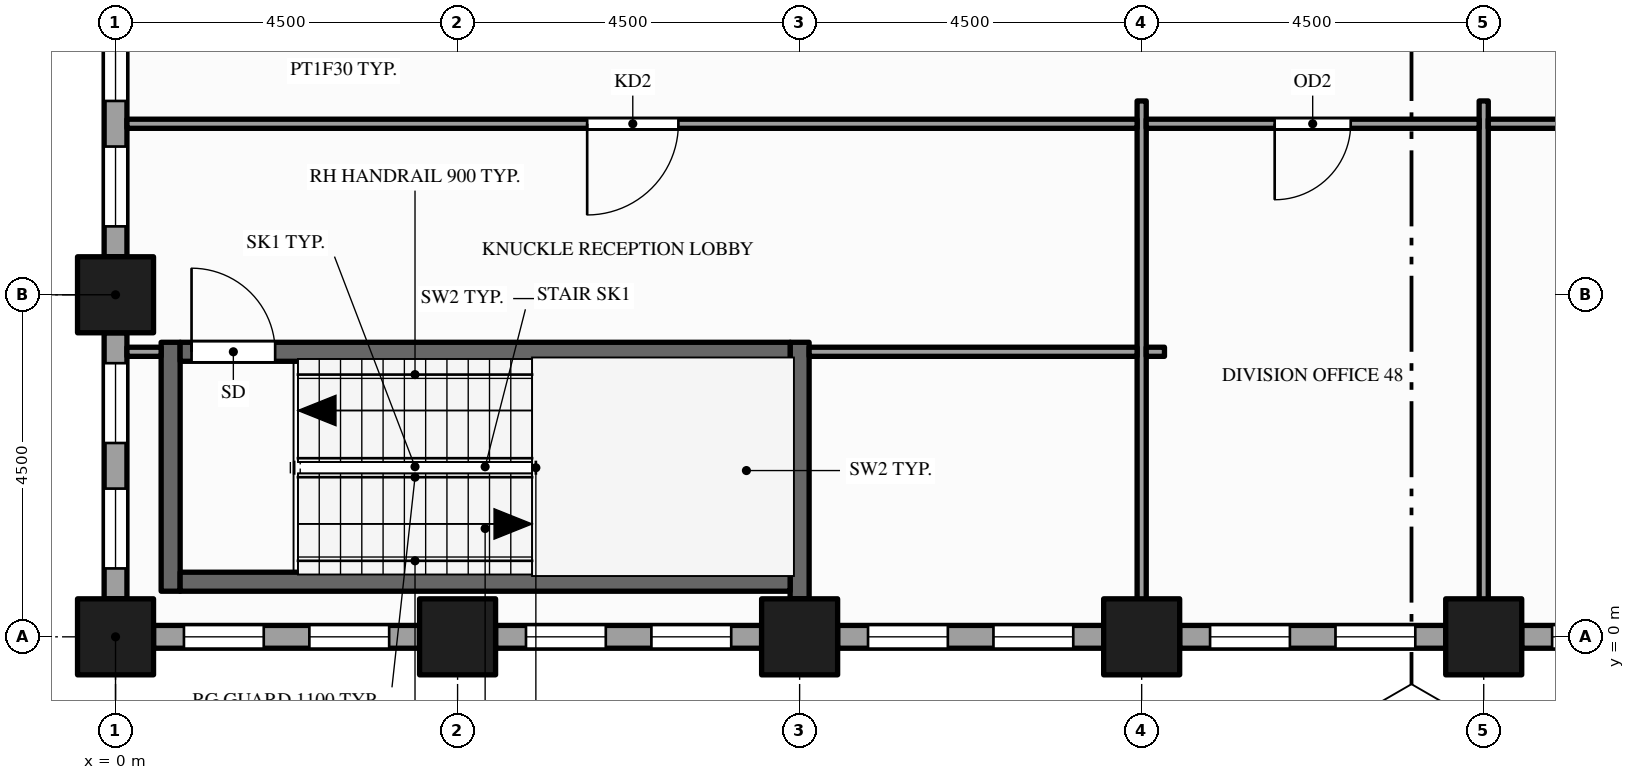
"""IFC4 building model, lengths in metres.
Left out: names, types, materials, properties, quantities, classifications, styles, units other than length and angle.
Written with IfcOpenShell. Run it as: python <this file> out.ifc"""

import sys

from ifc_helpers import new_model, si_unit, direction, frame, frame_2d, origin, origin_2d, place, context, subcontext, project, spatial, rectangle, hollow_rectangle, extrude, element, fill, save


model = new_model("IFC4")
c1 = context("Model", 3, precision=1e-05, world=origin(), true_north=direction((0.0, 1.0)))
c2 = subcontext(c1, "Body", "Model", "MODEL_VIEW")
j1 = project(units=[si_unit("LENGTHUNIT", "METRE"), si_unit("PLANEANGLEUNIT", "RADIAN")], contexts=[c1])
p1 = place(None, origin())
s1 = spatial("IfcSite", under=j1, at=p1, CompositionType="ELEMENT")
p2 = place(p1, origin())
s2 = spatial("IfcBuilding", under=s1, at=p2, CompositionType="ELEMENT")
p3 = place(p2, frame((0.0, 0.0, 107.0)))
s3 = spatial("IfcBuildingStorey", under=s2, at=p3, CompositionType="ELEMENT", Elevation=107.0)
for number, where, z_axis, x_axis in (
    (1, (0.0, 0.0, -0.15), (0.0, 0.0, 1.0), (1.0, 0.0, 0.0)),
    (2, (0.0, 4.5, -0.15), (0.0, 0.0, 1.0), (1.0, 0.0, 0.0)),
    (3, (4.5, 0.0, -0.15), (0.0, 0.0, 1.0), (1.0, 0.0, 0.0)),
    (4, (9.0, 0.0, -0.15), (0.0, 0.0, 1.0), (1.0, 0.0, 0.0)),
    (5, (13.5, 0.0, -0.15), (0.0, 0.0, 1.0), (1.0, 0.0, 0.0)),
    (6, (18.0, 0.0, -0.15), (0.0, 0.0, 1.0), (1.0, 0.0, 0.0)),
):
    element("IfcColumn", number, at=place(p3, frame(where, z_axis=z_axis, x_axis=x_axis)), inside=s3, PredefinedType="COLUMN", context=c2, shape_type="SweptSolid", body=[
        extrude(hollow_rectangle(XDim=1.0, YDim=1.0, WallThickness=0.05, at=origin_2d()), origin(), (0.0, 0.0, 1.0), 4.0),
    ])
p4 = place(p3, frame((0.0, 8.5, 0.0), z_axis=(0.0, 0.0, 1.0), x_axis=(0.0, -1.0, 0.0)))
e7 = element("IfcWall", 7, at=p4, inside=s3, PredefinedType="STANDARD", context=c2, shape_type="SweptSolid", body=[
    extrude(rectangle(XDim=3.5, YDim=0.3, at=frame_2d((1.75, 0.0))), origin(), (0.0, 0.0, 1.0), 3.154),
])
p5 = place(p4, frame((0.4, 0.0, 0.9)))
e8 = element("IfcOpeningElement", 8, at=p5, cuts=e7, PredefinedType="OPENING", context=c2, shape_type="SweptSolid", body=[
    extrude(rectangle(XDim=1.05, YDim=2.0, at=frame_2d((0.525, 1.0))), frame((0.0, 0.16, 0.0), z_axis=(0.0, -1.0, 0.0), x_axis=(1.0, 0.0, 0.0)), (0.0, 0.0, 1.0), 0.32),
])
p6 = place(p4, frame((2.05, 0.0, 0.9)))
e9 = element("IfcOpeningElement", 9, at=p6, cuts=e7, PredefinedType="OPENING", context=c2, shape_type="SweptSolid", body=[
    extrude(rectangle(XDim=1.05, YDim=2.0, at=frame_2d((0.525, 1.0))), frame((0.0, 0.16, 0.0), z_axis=(0.0, -1.0, 0.0), x_axis=(1.0, 0.0, 0.0)), (0.0, 0.0, 1.0), 0.32),
])
p7 = place(p3, frame((0.0, 4.0, 0.0), z_axis=(0.0, 0.0, 1.0), x_axis=(0.0, -1.0, 0.0)))
e10 = element("IfcWall", 10, at=p7, inside=s3, PredefinedType="STANDARD", context=c2, shape_type="SweptSolid", body=[
    extrude(rectangle(XDim=3.5, YDim=0.3, at=frame_2d((1.75, 0.0))), origin(), (0.0, 0.0, 1.0), 3.154),
])
p8 = place(p7, frame((0.4, 0.0, 0.9)))
e11 = element("IfcOpeningElement", 11, at=p8, cuts=e10, PredefinedType="OPENING", context=c2, shape_type="SweptSolid", body=[
    extrude(rectangle(XDim=1.05, YDim=2.0, at=frame_2d((0.525, 1.0))), frame((0.0, 0.16, 0.0), z_axis=(0.0, -1.0, 0.0), x_axis=(1.0, 0.0, 0.0)), (0.0, 0.0, 1.0), 0.32),
])
p9 = place(p7, frame((2.05, 0.0, 0.9)))
e12 = element("IfcOpeningElement", 12, at=p9, cuts=e10, PredefinedType="OPENING", context=c2, shape_type="SweptSolid", body=[
    extrude(rectangle(XDim=1.05, YDim=2.0, at=frame_2d((0.525, 1.0))), frame((0.0, 0.16, 0.0), z_axis=(0.0, -1.0, 0.0), x_axis=(1.0, 0.0, 0.0)), (0.0, 0.0, 1.0), 0.32),
])
p10 = place(p3, frame((0.5, 0.0, 0.0), z_axis=(0.0, 0.0, 1.0), x_axis=(1.0, 0.0, 0.0)))
e13 = element("IfcWall", 13, at=p10, inside=s3, PredefinedType="STANDARD", context=c2, shape_type="SweptSolid", body=[
    extrude(rectangle(XDim=3.5, YDim=0.3, at=frame_2d((1.75, 0.0))), origin(), (0.0, 0.0, 1.0), 3.154),
])
p11 = place(p10, frame((0.4, 0.0, 0.9)))
e14 = element("IfcOpeningElement", 14, at=p11, cuts=e13, PredefinedType="OPENING", context=c2, shape_type="SweptSolid", body=[
    extrude(rectangle(XDim=1.05, YDim=2.0, at=frame_2d((0.525, 1.0))), frame((0.0, 0.16, 0.0), z_axis=(0.0, -1.0, 0.0), x_axis=(1.0, 0.0, 0.0)), (0.0, 0.0, 1.0), 0.32),
])
p12 = place(p10, frame((2.05, 0.0, 0.9)))
e15 = element("IfcOpeningElement", 15, at=p12, cuts=e13, PredefinedType="OPENING", context=c2, shape_type="SweptSolid", body=[
    extrude(rectangle(XDim=1.05, YDim=2.0, at=frame_2d((0.525, 1.0))), frame((0.0, 0.16, 0.0), z_axis=(0.0, -1.0, 0.0), x_axis=(1.0, 0.0, 0.0)), (0.0, 0.0, 1.0), 0.32),
])
p13 = place(p3, frame((5.0, 0.0, 0.0), z_axis=(0.0, 0.0, 1.0), x_axis=(1.0, 0.0, 0.0)))
e16 = element("IfcWall", 16, at=p13, inside=s3, PredefinedType="STANDARD", context=c2, shape_type="SweptSolid", body=[
    extrude(rectangle(XDim=3.5, YDim=0.3, at=frame_2d((1.75, 0.0))), origin(), (0.0, 0.0, 1.0), 3.154),
])
p14 = place(p13, frame((0.4, 0.0, 0.9)))
e17 = element("IfcOpeningElement", 17, at=p14, cuts=e16, PredefinedType="OPENING", context=c2, shape_type="SweptSolid", body=[
    extrude(rectangle(XDim=1.05, YDim=2.0, at=frame_2d((0.525, 1.0))), frame((0.0, 0.16, 0.0), z_axis=(0.0, -1.0, 0.0), x_axis=(1.0, 0.0, 0.0)), (0.0, 0.0, 1.0), 0.32),
])
p15 = place(p13, frame((2.05, 0.0, 0.9)))
e18 = element("IfcOpeningElement", 18, at=p15, cuts=e16, PredefinedType="OPENING", context=c2, shape_type="SweptSolid", body=[
    extrude(rectangle(XDim=1.05, YDim=2.0, at=frame_2d((0.525, 1.0))), frame((0.0, 0.16, 0.0), z_axis=(0.0, -1.0, 0.0), x_axis=(1.0, 0.0, 0.0)), (0.0, 0.0, 1.0), 0.32),
])
p16 = place(p3, frame((9.5, 0.0, 0.0), z_axis=(0.0, 0.0, 1.0), x_axis=(1.0, 0.0, 0.0)))
e19 = element("IfcWall", 19, at=p16, inside=s3, PredefinedType="STANDARD", context=c2, shape_type="SweptSolid", body=[
    extrude(rectangle(XDim=3.5, YDim=0.3, at=frame_2d((1.75, 0.0))), origin(), (0.0, 0.0, 1.0), 3.154),
])
p17 = place(p16, frame((0.4, 0.0, 0.9)))
e20 = element("IfcOpeningElement", 20, at=p17, cuts=e19, PredefinedType="OPENING", context=c2, shape_type="SweptSolid", body=[
    extrude(rectangle(XDim=1.05, YDim=2.0, at=frame_2d((0.525, 1.0))), frame((0.0, 0.16, 0.0), z_axis=(0.0, -1.0, 0.0), x_axis=(1.0, 0.0, 0.0)), (0.0, 0.0, 1.0), 0.32),
])
p18 = place(p16, frame((2.05, 0.0, 0.9)))
e21 = element("IfcOpeningElement", 21, at=p18, cuts=e19, PredefinedType="OPENING", context=c2, shape_type="SweptSolid", body=[
    extrude(rectangle(XDim=1.05, YDim=2.0, at=frame_2d((0.525, 1.0))), frame((0.0, 0.16, 0.0), z_axis=(0.0, -1.0, 0.0), x_axis=(1.0, 0.0, 0.0)), (0.0, 0.0, 1.0), 0.32),
])
p19 = place(p3, frame((14.0, 0.0, 0.0), z_axis=(0.0, 0.0, 1.0), x_axis=(1.0, 0.0, 0.0)))
e22 = element("IfcWall", 22, at=p19, inside=s3, PredefinedType="STANDARD", context=c2, shape_type="SweptSolid", body=[
    extrude(rectangle(XDim=3.5, YDim=0.3, at=frame_2d((1.75, 0.0))), origin(), (0.0, 0.0, 1.0), 3.154),
])
p20 = place(p19, frame((0.4, 0.0, 0.9)))
e23 = element("IfcOpeningElement", 23, at=p20, cuts=e22, PredefinedType="OPENING", context=c2, shape_type="SweptSolid", body=[
    extrude(rectangle(XDim=1.05, YDim=2.0, at=frame_2d((0.525, 1.0))), frame((0.0, 0.16, 0.0), z_axis=(0.0, -1.0, 0.0), x_axis=(1.0, 0.0, 0.0)), (0.0, 0.0, 1.0), 0.32),
])
p21 = place(p19, frame((2.05, 0.0, 0.9)))
e24 = element("IfcOpeningElement", 24, at=p21, cuts=e22, PredefinedType="OPENING", context=c2, shape_type="SweptSolid", body=[
    extrude(rectangle(XDim=1.05, YDim=2.0, at=frame_2d((0.525, 1.0))), frame((0.0, 0.16, 0.0), z_axis=(0.0, -1.0, 0.0), x_axis=(1.0, 0.0, 0.0)), (0.0, 0.0, 1.0), 0.32),
])
p22 = place(p3, frame((18.5, 0.0, 0.0), z_axis=(0.0, 0.0, 1.0), x_axis=(1.0, 0.0, 0.0)))
e25 = element("IfcWall", 25, at=p22, inside=s3, PredefinedType="STANDARD", context=c2, shape_type="SweptSolid", body=[
    extrude(rectangle(XDim=3.5, YDim=0.3, at=frame_2d((1.75, 0.0))), origin(), (0.0, 0.0, 1.0), 3.154),
])
p23 = place(p22, frame((0.4, 0.0, 0.9)))
e26 = element("IfcOpeningElement", 26, at=p23, cuts=e25, PredefinedType="OPENING", context=c2, shape_type="SweptSolid", body=[
    extrude(rectangle(XDim=1.05, YDim=2.0, at=frame_2d((0.525, 1.0))), frame((0.0, 0.16, 0.0), z_axis=(0.0, -1.0, 0.0), x_axis=(1.0, 0.0, 0.0)), (0.0, 0.0, 1.0), 0.32),
])
p24 = place(p22, frame((2.05, 0.0, 0.9)))
e27 = element("IfcOpeningElement", 27, at=p24, cuts=e25, PredefinedType="OPENING", context=c2, shape_type="SweptSolid", body=[
    extrude(rectangle(XDim=1.05, YDim=2.0, at=frame_2d((0.525, 1.0))), frame((0.0, 0.16, 0.0), z_axis=(0.0, -1.0, 0.0), x_axis=(1.0, 0.0, 0.0)), (0.0, 0.0, 1.0), 0.32),
])
p25 = place(p3, frame((0.725, 0.6, 0.0), z_axis=(0.0, 0.0, 1.0), x_axis=(0.0, 1.0, 0.0)))
e28 = element("IfcWall", 28, at=p25, inside=s3, PredefinedType="SHEAR", context=c2, shape_type="SweptSolid", body=[
    extrude(rectangle(XDim=3.275, YDim=0.25, at=frame_2d((1.637, 0.0))), origin(), (0.0, 0.0, 1.0), 3.85),
])
p26 = place(p3, frame((9.0, 0.5, 0.0), z_axis=(0.0, 0.0, 1.0), x_axis=(0.0, 1.0, 0.0)))
e29 = element("IfcWall", 29, at=p26, inside=s3, PredefinedType="SHEAR", context=c2, shape_type="SweptSolid", body=[
    extrude(rectangle(XDim=3.375, YDim=0.25, at=frame_2d((1.688, 0.0))), origin(), (0.0, 0.0, 1.0), 3.85),
])
for number, where, z_axis, x_axis in (
    (30, (13.5, 0.15, 0.0), (0.0, 0.0, 1.0), (0.0, 1.0, 0.0)),
    (31, (18.0, 0.15, 0.0), (0.0, 0.0, 1.0), (0.0, 1.0, 0.0)),
):
    element("IfcWall", number, at=place(p3, frame(where, z_axis=z_axis, x_axis=x_axis)), inside=s3, PredefinedType="PARTITIONING", context=c2, shape_type="SweptSolid", body=[
        extrude(rectangle(XDim=6.9, YDim=0.12, at=frame_2d((3.45, 0.0))), origin(), (0.0, 0.0, 1.0), 2.938),
    ])
p27 = place(p3, frame((0.85, 0.725, 0.0), z_axis=(0.0, 0.0, 1.0), x_axis=(1.0, 0.0, 0.0)))
e32 = element("IfcWall", 32, at=p27, inside=s3, PredefinedType="SHEAR", context=c2, shape_type="SweptSolid", body=[
    extrude(rectangle(XDim=8.025, YDim=0.25, at=frame_2d((4.012, 0.0))), origin(), (0.0, 0.0, 1.0), 3.85),
])
p28 = place(p3, frame((0.15, 3.75, 0.0), z_axis=(0.0, 0.0, 1.0), x_axis=(1.0, 0.0, 0.0)))
e33 = element("IfcWall", 33, at=p28, inside=s3, PredefinedType="PARTITIONING", context=c2, shape_type="SweptSolid", body=[
    extrude(rectangle(XDim=0.45, YDim=0.12, at=frame_2d((0.225, 0.0))), origin(), (0.0, 0.0, 1.0), 3.154),
])
p29 = place(p3, frame((0.85, 3.75, 0.0), z_axis=(0.0, 0.0, 1.0), x_axis=(1.0, 0.0, 0.0)))
e34 = element("IfcWall", 34, at=p29, inside=s3, PredefinedType="SHEAR", context=c2, shape_type="SweptSolid", body=[
    extrude(rectangle(XDim=8.025, YDim=0.25, at=frame_2d((4.012, 0.0))), origin(), (0.0, 0.0, 1.0), 3.85),
])
p30 = place(p29, frame((0.15, 0.0, 0.0)))
e35 = element("IfcOpeningElement", 35, at=p30, cuts=e34, PredefinedType="OPENING", context=c2, shape_type="SweptSolid", body=[
    extrude(rectangle(XDim=1.1, YDim=2.1, at=frame_2d((0.55, 1.05))), frame((0.0, 0.135, 0.0), z_axis=(0.0, -1.0, 0.0), x_axis=(1.0, 0.0, 0.0)), (0.0, 0.0, 1.0), 0.27),
])
p31 = place(p3, frame((9.125, 3.75, 0.0), z_axis=(0.0, 0.0, 1.0), x_axis=(1.0, 0.0, 0.0)))
e36 = element("IfcWall", 36, at=p31, inside=s3, PredefinedType="PARTITIONING", context=c2, shape_type="SweptSolid", body=[
    extrude(rectangle(XDim=4.315, YDim=0.12, at=frame_2d((2.157, 0.0))), origin(), (0.0, 0.0, 1.0), 2.938),
])
p32 = place(p3, frame((13.56, 3.75, 0.0), z_axis=(0.0, 0.0, 1.0), x_axis=(1.0, 0.0, 0.0)))
e37 = element("IfcWall", 37, at=p32, inside=s3, PredefinedType="PARTITIONING", context=c2, shape_type="SweptSolid", body=[
    extrude(rectangle(XDim=0.24, YDim=0.12, at=frame_2d((0.12, 0.0))), origin(), (0.0, 0.0, 1.0), 2.938),
])
p33 = place(p3, frame((0.15, 6.75, 0.0), z_axis=(0.0, 0.0, 1.0), x_axis=(1.0, 0.0, 0.0)))
e38 = element("IfcWall", 38, at=p33, inside=s3, PredefinedType="PARTITIONING", context=c2, shape_type="SweptSolid", body=[
    extrude(rectangle(XDim=13.29, YDim=0.12, at=frame_2d((6.645, 0.0))), origin(), (0.0, 0.0, 1.0), 2.938),
])
p34 = place(p33, frame((6.055, 0.0, 0.0)))
e39 = element("IfcOpeningElement", 39, at=p34, cuts=e38, PredefinedType="OPENING", context=c2, shape_type="SweptSolid", body=[
    extrude(rectangle(XDim=1.2, YDim=2.1, at=frame_2d((0.6, 1.05))), frame((0.0, 0.07, 0.0), z_axis=(0.0, -1.0, 0.0), x_axis=(1.0, 0.0, 0.0)), (0.0, 0.0, 1.0), 0.14),
])
p35 = place(p3, frame((13.56, 6.75, 0.0), z_axis=(0.0, 0.0, 1.0), x_axis=(1.0, 0.0, 0.0)))
e40 = element("IfcWall", 40, at=p35, inside=s3, PredefinedType="PARTITIONING", context=c2, shape_type="SweptSolid", body=[
    extrude(rectangle(XDim=4.38, YDim=0.12, at=frame_2d((2.19, 0.0))), origin(), (0.0, 0.0, 1.0), 2.938),
])
p36 = place(p35, frame((1.69, 0.0, 0.0)))
e41 = element("IfcOpeningElement", 41, at=p36, cuts=e40, PredefinedType="OPENING", context=c2, shape_type="SweptSolid", body=[
    extrude(rectangle(XDim=1.0, YDim=2.1, at=frame_2d((0.5, 1.05))), frame((0.0, 0.07, 0.0), z_axis=(0.0, -1.0, 0.0), x_axis=(1.0, 0.0, 0.0)), (0.0, 0.0, 1.0), 0.14),
])
p37 = place(p3, frame((18.06, 6.75, 0.0), z_axis=(0.0, 0.0, 1.0), x_axis=(1.0, 0.0, 0.0)))
e42 = element("IfcWall", 42, at=p37, inside=s3, PredefinedType="PARTITIONING", context=c2, shape_type="SweptSolid", body=[
    extrude(rectangle(XDim=4.38, YDim=0.12, at=frame_2d((2.19, 0.0))), origin(), (0.0, 0.0, 1.0), 2.938),
])
p38 = place(p37, frame((1.69, 0.0, 0.0)))
e43 = element("IfcOpeningElement", 43, at=p38, cuts=e42, PredefinedType="OPENING", context=c2, shape_type="SweptSolid", body=[
    extrude(rectangle(XDim=1.0, YDim=2.1, at=frame_2d((0.5, 1.05))), frame((0.0, 0.07, 0.0), z_axis=(0.0, -1.0, 0.0), x_axis=(1.0, 0.0, 0.0)), (0.0, 0.0, 1.0), 0.14),
])
p39 = place(p5, origin())
e44 = element("IfcWindow", 44, at=p39, inside=s3, PartitioningType="SINGLE_PANEL", PredefinedType="WINDOW", context=c2, shape_type="SweptSolid", body=[
    extrude(rectangle(XDim=1.05, YDim=2.0, at=frame_2d((0.525, 1.0))), frame((0.0, 0.03, 0.0), z_axis=(0.0, -1.0, 0.0), x_axis=(1.0, 0.0, 0.0)), (0.0, 0.0, 1.0), 0.06),
])
fill(e8, e44)
p40 = place(p6, origin())
e45 = element("IfcWindow", 45, at=p40, inside=s3, PartitioningType="SINGLE_PANEL", PredefinedType="WINDOW", context=c2, shape_type="SweptSolid", body=[
    extrude(rectangle(XDim=1.05, YDim=2.0, at=frame_2d((0.525, 1.0))), frame((0.0, 0.03, 0.0), z_axis=(0.0, -1.0, 0.0), x_axis=(1.0, 0.0, 0.0)), (0.0, 0.0, 1.0), 0.06),
])
fill(e9, e45)
p41 = place(p8, origin())
e46 = element("IfcWindow", 46, at=p41, inside=s3, PartitioningType="SINGLE_PANEL", PredefinedType="WINDOW", context=c2, shape_type="SweptSolid", body=[
    extrude(rectangle(XDim=1.05, YDim=2.0, at=frame_2d((0.525, 1.0))), frame((0.0, 0.03, 0.0), z_axis=(0.0, -1.0, 0.0), x_axis=(1.0, 0.0, 0.0)), (0.0, 0.0, 1.0), 0.06),
])
fill(e11, e46)
p42 = place(p9, origin())
e47 = element("IfcWindow", 47, at=p42, inside=s3, PartitioningType="SINGLE_PANEL", PredefinedType="WINDOW", context=c2, shape_type="SweptSolid", body=[
    extrude(rectangle(XDim=1.05, YDim=2.0, at=frame_2d((0.525, 1.0))), frame((0.0, 0.03, 0.0), z_axis=(0.0, -1.0, 0.0), x_axis=(1.0, 0.0, 0.0)), (0.0, 0.0, 1.0), 0.06),
])
fill(e12, e47)
p43 = place(p11, origin())
e48 = element("IfcWindow", 48, at=p43, inside=s3, PartitioningType="SINGLE_PANEL", PredefinedType="WINDOW", context=c2, shape_type="SweptSolid", body=[
    extrude(rectangle(XDim=1.05, YDim=2.0, at=frame_2d((0.525, 1.0))), frame((0.0, 0.03, 0.0), z_axis=(0.0, -1.0, 0.0), x_axis=(1.0, 0.0, 0.0)), (0.0, 0.0, 1.0), 0.06),
])
fill(e14, e48)
p44 = place(p12, origin())
e49 = element("IfcWindow", 49, at=p44, inside=s3, PartitioningType="SINGLE_PANEL", PredefinedType="WINDOW", context=c2, shape_type="SweptSolid", body=[
    extrude(rectangle(XDim=1.05, YDim=2.0, at=frame_2d((0.525, 1.0))), frame((0.0, 0.03, 0.0), z_axis=(0.0, -1.0, 0.0), x_axis=(1.0, 0.0, 0.0)), (0.0, 0.0, 1.0), 0.06),
])
fill(e15, e49)
p45 = place(p14, origin())
e50 = element("IfcWindow", 50, at=p45, inside=s3, PartitioningType="SINGLE_PANEL", PredefinedType="WINDOW", context=c2, shape_type="SweptSolid", body=[
    extrude(rectangle(XDim=1.05, YDim=2.0, at=frame_2d((0.525, 1.0))), frame((0.0, 0.03, 0.0), z_axis=(0.0, -1.0, 0.0), x_axis=(1.0, 0.0, 0.0)), (0.0, 0.0, 1.0), 0.06),
])
fill(e17, e50)
p46 = place(p15, origin())
e51 = element("IfcWindow", 51, at=p46, inside=s3, PartitioningType="SINGLE_PANEL", PredefinedType="WINDOW", context=c2, shape_type="SweptSolid", body=[
    extrude(rectangle(XDim=1.05, YDim=2.0, at=frame_2d((0.525, 1.0))), frame((0.0, 0.03, 0.0), z_axis=(0.0, -1.0, 0.0), x_axis=(1.0, 0.0, 0.0)), (0.0, 0.0, 1.0), 0.06),
])
fill(e18, e51)
p47 = place(p17, origin())
e52 = element("IfcWindow", 52, at=p47, inside=s3, PartitioningType="SINGLE_PANEL", PredefinedType="WINDOW", context=c2, shape_type="SweptSolid", body=[
    extrude(rectangle(XDim=1.05, YDim=2.0, at=frame_2d((0.525, 1.0))), frame((0.0, 0.03, 0.0), z_axis=(0.0, -1.0, 0.0), x_axis=(1.0, 0.0, 0.0)), (0.0, 0.0, 1.0), 0.06),
])
fill(e20, e52)
p48 = place(p18, origin())
e53 = element("IfcWindow", 53, at=p48, inside=s3, PartitioningType="SINGLE_PANEL", PredefinedType="WINDOW", context=c2, shape_type="SweptSolid", body=[
    extrude(rectangle(XDim=1.05, YDim=2.0, at=frame_2d((0.525, 1.0))), frame((0.0, 0.03, 0.0), z_axis=(0.0, -1.0, 0.0), x_axis=(1.0, 0.0, 0.0)), (0.0, 0.0, 1.0), 0.06),
])
fill(e21, e53)
p49 = place(p20, origin())
e54 = element("IfcWindow", 54, at=p49, inside=s3, PartitioningType="SINGLE_PANEL", PredefinedType="WINDOW", context=c2, shape_type="SweptSolid", body=[
    extrude(rectangle(XDim=1.05, YDim=2.0, at=frame_2d((0.525, 1.0))), frame((0.0, 0.03, 0.0), z_axis=(0.0, -1.0, 0.0), x_axis=(1.0, 0.0, 0.0)), (0.0, 0.0, 1.0), 0.06),
])
fill(e23, e54)
p50 = place(p21, origin())
e55 = element("IfcWindow", 55, at=p50, inside=s3, PartitioningType="SINGLE_PANEL", PredefinedType="WINDOW", context=c2, shape_type="SweptSolid", body=[
    extrude(rectangle(XDim=1.05, YDim=2.0, at=frame_2d((0.525, 1.0))), frame((0.0, 0.03, 0.0), z_axis=(0.0, -1.0, 0.0), x_axis=(1.0, 0.0, 0.0)), (0.0, 0.0, 1.0), 0.06),
])
fill(e24, e55)
p51 = place(p23, origin())
e56 = element("IfcWindow", 56, at=p51, inside=s3, PartitioningType="SINGLE_PANEL", PredefinedType="WINDOW", context=c2, shape_type="SweptSolid", body=[
    extrude(rectangle(XDim=1.05, YDim=2.0, at=frame_2d((0.525, 1.0))), frame((0.0, 0.03, 0.0), z_axis=(0.0, -1.0, 0.0), x_axis=(1.0, 0.0, 0.0)), (0.0, 0.0, 1.0), 0.06),
])
fill(e26, e56)
p52 = place(p30, origin())
e57 = element("IfcDoor", 57, at=p52, inside=s3, OperationType="SINGLE_SWING_LEFT", PredefinedType="DOOR", context=c2, shape_type="SweptSolid", body=[
    extrude(rectangle(XDim=1.1, YDim=2.1, at=frame_2d((0.55, 1.05))), frame((0.0, 0.025, 0.0), z_axis=(0.0, -1.0, 0.0), x_axis=(1.0, 0.0, 0.0)), (0.0, 0.0, 1.0), 0.05),
])
fill(e35, e57)
p53 = place(p34, origin())
e58 = element("IfcDoor", 58, at=p53, inside=s3, OperationType="SINGLE_SWING_LEFT", PredefinedType="DOOR", context=c2, shape_type="SweptSolid", body=[
    extrude(rectangle(XDim=1.2, YDim=2.1, at=frame_2d((0.6, 1.05))), frame((0.0, 0.025, 0.0), z_axis=(0.0, -1.0, 0.0), x_axis=(1.0, 0.0, 0.0)), (0.0, 0.0, 1.0), 0.05),
])
fill(e39, e58)
p54 = place(p36, origin())
e59 = element("IfcDoor", 59, at=p54, inside=s3, OperationType="SINGLE_SWING_LEFT", PredefinedType="DOOR", context=c2, shape_type="SweptSolid", body=[
    extrude(rectangle(XDim=1.0, YDim=2.1, at=frame_2d((0.5, 1.05))), frame((0.0, 0.025, 0.0), z_axis=(0.0, -1.0, 0.0), x_axis=(1.0, 0.0, 0.0)), (0.0, 0.0, 1.0), 0.05),
])
fill(e41, e59)
save(model, sys.argv[1])
